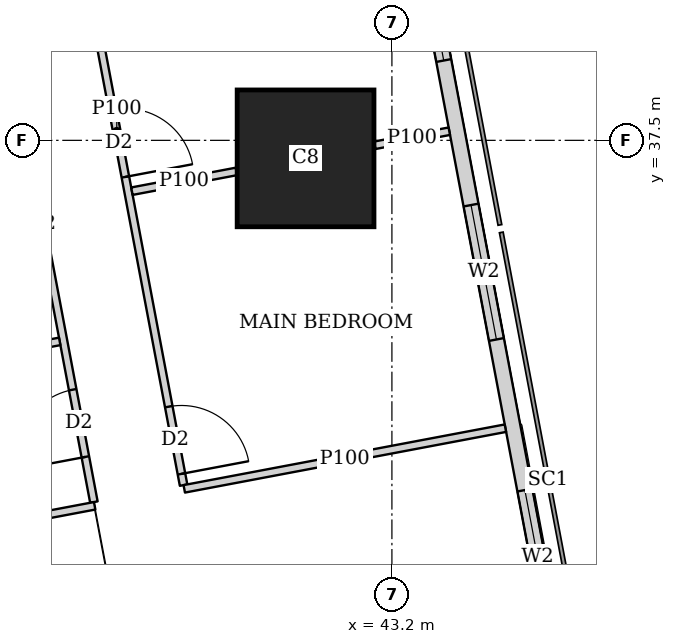
"""IFC4 building model, lengths in metres.
Left out: names, types, materials, properties, quantities, classifications, styles, units other than length and angle.
Written with IfcOpenShell. Run it as: python <this file> out.ifc"""

import sys

from ifc_helpers import new_model, si_unit, direction, frame, frame_2d, origin, origin_2d, place, context, subcontext, project, spatial, rectangle, extrude, element, fill, save


model = new_model("IFC4")
c1 = context("Model", 3, precision=1e-05, world=origin(), true_north=direction((0.0, 1.0)))
c2 = subcontext(c1, "Body", "Model", "MODEL_VIEW")
j1 = project(units=[si_unit("LENGTHUNIT", "METRE"), si_unit("PLANEANGLEUNIT", "RADIAN")], contexts=[c1])
p1 = place(None, origin())
s1 = spatial("IfcSite", under=j1, at=p1, CompositionType="ELEMENT")
p2 = place(p1, origin())
s2 = spatial("IfcBuilding", under=s1, at=p2, CompositionType="ELEMENT")
p3 = place(p2, frame((0.0, 0.0, 147.05)))
s3 = spatial("IfcBuildingStorey", under=s2, at=p3, CompositionType="ELEMENT", Elevation=147.05)
p4 = place(p3, frame((42.064, 37.263, 0.0), z_axis=(0.0, 0.0, 1.0), x_axis=(1.0, 0.0, 0.0)))
e1 = element("IfcColumn", 1, at=p4, inside=s3, PredefinedType="COLUMN", context=c2, shape_type="SweptSolid", body=[
    extrude(rectangle(XDim=1.8, YDim=1.8, at=origin_2d()), origin(), (0.0, 0.0, 1.0), 3.75),
])
p5 = place(p3, frame((50.653, 2.703, 0.0), z_axis=(0.0, 0.0, 1.0), x_axis=(-0.185612026696, 0.982623109613, 0.0)))
e2 = element("IfcWall", 2, at=p5, inside=s3, PredefinedType="SOLIDWALL", context=c2, shape_type="SweptSolid", body=[
    extrude(rectangle(XDim=41.393, YDim=0.2, at=frame_2d((20.697, 0.0))), origin(), (0.0, 0.0, 1.0), 3.5),
])
p6 = place(p5, frame((1.633, 0.0, 0.9)))
e3 = element("IfcOpeningElement", 3, at=p6, cuts=e2, PredefinedType="OPENING", context=c2, shape_type="SweptSolid", body=[
    extrude(rectangle(XDim=1.8, YDim=1.5, at=frame_2d((0.9, 0.75))), frame((0.0, 0.11, 0.0), z_axis=(0.0, -1.0, 0.0), x_axis=(1.0, 0.0, 0.0)), (0.0, 0.0, 1.0), 0.22),
])
p7 = place(p5, frame((6.032, 0.0, 0.9)))
e4 = element("IfcOpeningElement", 4, at=p7, cuts=e2, PredefinedType="OPENING", context=c2, shape_type="SweptSolid", body=[
    extrude(rectangle(XDim=1.8, YDim=1.5, at=frame_2d((0.9, 0.75))), frame((0.0, 0.11, 0.0), z_axis=(0.0, -1.0, 0.0), x_axis=(1.0, 0.0, 0.0)), (0.0, 0.0, 1.0), 0.22),
])
p8 = place(p5, frame((9.848, 0.0, 0.9)))
e5 = element("IfcOpeningElement", 5, at=p8, cuts=e2, PredefinedType="OPENING", context=c2, shape_type="SweptSolid", body=[
    extrude(rectangle(XDim=1.8, YDim=1.5, at=frame_2d((0.9, 0.75))), frame((0.0, 0.11, 0.0), z_axis=(0.0, -1.0, 0.0), x_axis=(1.0, 0.0, 0.0)), (0.0, 0.0, 1.0), 0.22),
])
p9 = place(p5, frame((13.664, 0.0, 0.9)))
e6 = element("IfcOpeningElement", 6, at=p9, cuts=e2, PredefinedType="OPENING", context=c2, shape_type="SweptSolid", body=[
    extrude(rectangle(XDim=1.8, YDim=1.5, at=frame_2d((0.9, 0.75))), frame((0.0, 0.11, 0.0), z_axis=(0.0, -1.0, 0.0), x_axis=(1.0, 0.0, 0.0)), (0.0, 0.0, 1.0), 0.22),
])
p10 = place(p5, frame((17.481, 0.0, 0.9)))
e7 = element("IfcOpeningElement", 7, at=p10, cuts=e2, PredefinedType="OPENING", context=c2, shape_type="SweptSolid", body=[
    extrude(rectangle(XDim=1.8, YDim=1.5, at=frame_2d((0.9, 0.75))), frame((0.0, 0.11, 0.0), z_axis=(0.0, -1.0, 0.0), x_axis=(1.0, 0.0, 0.0)), (0.0, 0.0, 1.0), 0.22),
])
p11 = place(p5, frame((21.297, 0.0, 0.9)))
e8 = element("IfcOpeningElement", 8, at=p11, cuts=e2, PredefinedType="OPENING", context=c2, shape_type="SweptSolid", body=[
    extrude(rectangle(XDim=1.8, YDim=1.5, at=frame_2d((0.9, 0.75))), frame((0.0, 0.11, 0.0), z_axis=(0.0, -1.0, 0.0), x_axis=(1.0, 0.0, 0.0)), (0.0, 0.0, 1.0), 0.22),
])
p12 = place(p5, frame((25.113, 0.0, 0.9)))
e9 = element("IfcOpeningElement", 9, at=p12, cuts=e2, PredefinedType="OPENING", context=c2, shape_type="SweptSolid", body=[
    extrude(rectangle(XDim=1.8, YDim=1.5, at=frame_2d((0.9, 0.75))), frame((0.0, 0.11, 0.0), z_axis=(0.0, -1.0, 0.0), x_axis=(1.0, 0.0, 0.0)), (0.0, 0.0, 1.0), 0.22),
])
p13 = place(p5, frame((28.93, 0.0, 0.9)))
e10 = element("IfcOpeningElement", 10, at=p13, cuts=e2, PredefinedType="OPENING", context=c2, shape_type="SweptSolid", body=[
    extrude(rectangle(XDim=1.8, YDim=1.5, at=frame_2d((0.9, 0.75))), frame((0.0, 0.11, 0.0), z_axis=(0.0, -1.0, 0.0), x_axis=(1.0, 0.0, 0.0)), (0.0, 0.0, 1.0), 0.22),
])
p14 = place(p5, frame((32.746, 0.0, 0.9)))
e11 = element("IfcOpeningElement", 11, at=p14, cuts=e2, PredefinedType="OPENING", context=c2, shape_type="SweptSolid", body=[
    extrude(rectangle(XDim=1.8, YDim=1.5, at=frame_2d((0.9, 0.75))), frame((0.0, 0.11, 0.0), z_axis=(0.0, -1.0, 0.0), x_axis=(1.0, 0.0, 0.0)), (0.0, 0.0, 1.0), 0.22),
])
p15 = place(p5, frame((36.481, 0.0, 0.9)))
e12 = element("IfcOpeningElement", 12, at=p15, cuts=e2, PredefinedType="OPENING", context=c2, shape_type="SweptSolid", body=[
    extrude(rectangle(XDim=1.8, YDim=1.5, at=frame_2d((0.9, 0.75))), frame((0.0, 0.11, 0.0), z_axis=(0.0, -1.0, 0.0), x_axis=(1.0, 0.0, 0.0)), (0.0, 0.0, 1.0), 0.22),
])
p16 = place(p3, frame((33.877, 43.029, 0.0), z_axis=(0.0, 0.0, 1.0), x_axis=(0.185596841028, -0.98262597798, 0.0)))
e13 = element("IfcWall", 13, at=p16, inside=s3, PredefinedType="SOLIDWALL", context=c2, shape_type="SweptSolid", body=[
    extrude(rectangle(XDim=41.66, YDim=0.15, at=frame_2d((20.83, 0.0))), origin(), (0.0, 0.0, 1.0), 2.5),
])
p17 = place(p16, frame((12.57, 0.0, 0.0)))
e14 = element("IfcOpeningElement", 14, at=p17, cuts=e13, PredefinedType="OPENING", context=c2, shape_type="SweptSolid", body=[
    extrude(rectangle(XDim=1.0, YDim=2.1, at=frame_2d((0.5, 1.05))), frame((0.0, 0.085, 0.0), z_axis=(0.0, -1.0, 0.0), x_axis=(1.0, 0.0, 0.0)), (0.0, 0.0, 1.0), 0.17),
])
p18 = place(p16, frame((16.386, 0.0, 0.0)))
e15 = element("IfcOpeningElement", 15, at=p18, cuts=e13, PredefinedType="OPENING", context=c2, shape_type="SweptSolid", body=[
    extrude(rectangle(XDim=1.0, YDim=2.1, at=frame_2d((0.5, 1.05))), frame((0.0, 0.085, 0.0), z_axis=(0.0, -1.0, 0.0), x_axis=(1.0, 0.0, 0.0)), (0.0, 0.0, 1.0), 0.17),
])
p19 = place(p16, frame((31.166, 0.0, 0.0)))
e16 = element("IfcOpeningElement", 16, at=p19, cuts=e13, PredefinedType="OPENING", context=c2, shape_type="SweptSolid", body=[
    extrude(rectangle(XDim=1.0, YDim=2.1, at=frame_2d((0.5, 1.05))), frame((0.0, 0.085, 0.0), z_axis=(0.0, -1.0, 0.0), x_axis=(1.0, 0.0, 0.0)), (0.0, 0.0, 1.0), 0.17),
])
p20 = place(p3, frame((38.701, 42.27, 0.0), z_axis=(0.0, 0.0, 1.0), x_axis=(0.185634707842, -0.982618825, 0.0)))
e17 = element("IfcWall", 17, at=p20, inside=s3, PredefinedType="PARTITIONING", context=c2, shape_type="SweptSolid", body=[
    extrude(rectangle(XDim=9.47, YDim=0.1, at=frame_2d((4.735, 0.0))), origin(), (0.0, 0.0, 1.0), 3.5),
])
p21 = place(p20, frame((8.42, 0.0, 0.0)))
e18 = element("IfcOpeningElement", 18, at=p21, cuts=e17, PredefinedType="OPENING", context=c2, shape_type="SweptSolid", body=[
    extrude(rectangle(XDim=0.9, YDim=2.1, at=frame_2d((0.45, 1.05))), frame((0.0, 0.06, 0.0), z_axis=(0.0, -1.0, 0.0), x_axis=(1.0, 0.0, 0.0)), (0.0, 0.0, 1.0), 0.12),
])
p22 = place(p20, frame((4.444, 0.0, 0.0)))
e19 = element("IfcOpeningElement", 19, at=p22, cuts=e17, PredefinedType="OPENING", context=c2, shape_type="SweptSolid", body=[
    extrude(rectangle(XDim=0.9, YDim=2.1, at=frame_2d((0.45, 1.05))), frame((0.0, 0.06, 0.0), z_axis=(0.0, -1.0, 0.0), x_axis=(1.0, 0.0, 0.0)), (0.0, 0.0, 1.0), 0.12),
])
p23 = place(p3, frame((37.411, 42.638, 0.0), z_axis=(0.0, 0.0, 1.0), x_axis=(0.185485587071, -0.982646984928, 0.0)))
e20 = element("IfcWall", 20, at=p23, inside=s3, PredefinedType="PARTITIONING", context=c2, shape_type="SweptSolid", body=[
    extrude(rectangle(XDim=10.072, YDim=0.1, at=frame_2d((5.036, 0.0))), origin(), (0.0, 0.0, 1.0), 3.5),
])
p24 = place(p23, frame((8.567, 0.0, 0.0)))
e21 = element("IfcOpeningElement", 21, at=p24, cuts=e20, PredefinedType="OPENING", context=c2, shape_type="SweptSolid", body=[
    extrude(rectangle(XDim=0.9, YDim=2.1, at=frame_2d((0.45, 1.05))), frame((0.0, 0.06, 0.0), z_axis=(0.0, -1.0, 0.0), x_axis=(1.0, 0.0, 0.0)), (0.0, 0.0, 1.0), 0.12),
])
p25 = place(p23, frame((3.188, 0.0, 0.0)))
e22 = element("IfcOpeningElement", 22, at=p25, cuts=e20, PredefinedType="OPENING", context=c2, shape_type="SweptSolid", body=[
    extrude(rectangle(XDim=0.9, YDim=2.1, at=frame_2d((0.45, 1.05))), frame((0.0, 0.06, 0.0), z_axis=(0.0, -1.0, 0.0), x_axis=(1.0, 0.0, 0.0)), (0.0, 0.0, 1.0), 0.12),
])
p26 = place(p23, frame((1.129, 0.0, 0.0)))
e23 = element("IfcOpeningElement", 23, at=p26, cuts=e20, PredefinedType="OPENING", context=c2, shape_type="SweptSolid", body=[
    extrude(rectangle(XDim=0.9, YDim=2.1, at=frame_2d((0.45, 1.05))), frame((0.0, 0.06, 0.0), z_axis=(0.0, -1.0, 0.0), x_axis=(1.0, 0.0, 0.0)), (0.0, 0.0, 1.0), 0.12),
])
p27 = place(p23, frame((5.899, 0.0, 0.0)))
e24 = element("IfcOpeningElement", 24, at=p27, cuts=e20, PredefinedType="OPENING", context=c2, shape_type="SweptSolid", body=[
    extrude(rectangle(XDim=0.9, YDim=2.1, at=frame_2d((0.45, 1.05))), frame((0.0, 0.06, 0.0), z_axis=(0.0, -1.0, 0.0), x_axis=(1.0, 0.0, 0.0)), (0.0, 0.0, 1.0), 0.12),
])
p28 = place(p3, frame((43.955, 37.62, 0.0), z_axis=(0.0, 0.0, 1.0), x_axis=(-0.982666697719, -0.185381124159, 0.0)))
e25 = element("IfcWall", 25, at=p28, inside=s3, PredefinedType="PARTITIONING", context=c2, shape_type="SweptSolid", body=[
    extrude(rectangle(XDim=0.998, YDim=0.1, at=frame_2d((0.499, 0.0))), origin(), (0.0, 0.0, 1.0), 3.5),
])
p29 = place(p3, frame((41.154, 37.091, 0.0), z_axis=(0.0, 0.0, 1.0), x_axis=(-0.982586605669, -0.185805173125, 0.0)))
e26 = element("IfcWall", 26, at=p29, inside=s3, PredefinedType="PARTITIONING", context=c2, shape_type="SweptSolid", body=[
    extrude(rectangle(XDim=1.399, YDim=0.1, at=frame_2d((0.7, 0.0))), origin(), (0.0, 0.0, 1.0), 3.5),
])
p30 = place(p3, frame((44.693, 33.713, 0.0), z_axis=(0.0, 0.0, 1.0), x_axis=(-0.982633535512, -0.185556823879, 0.0)))
e27 = element("IfcWall", 27, at=p30, inside=s3, PredefinedType="PARTITIONING", context=c2, shape_type="SweptSolid", body=[
    extrude(rectangle(XDim=4.3, YDim=0.1, at=frame_2d((2.15, 0.0))), origin(), (0.0, 0.0, 1.0), 2.1),
])
p31 = place(p3, frame((39.289, 32.692, 0.0), z_axis=(0.0, 0.0, 1.0), x_axis=(-0.982633623707, -0.185556356831, 0.0)))
e28 = element("IfcWall", 28, at=p31, inside=s3, PredefinedType="PARTITIONING", context=c2, shape_type="SweptSolid", body=[
    extrude(rectangle(XDim=3.325, YDim=0.1, at=frame_2d((1.663, 0.0))), origin(), (0.0, 0.0, 1.0), 3.5),
])
p32 = place(p3, frame((38.829, 34.855, 0.0), z_axis=(0.0, 0.0, 1.0), x_axis=(-0.982610347627, -0.185679575441, 0.0)))
e29 = element("IfcWall", 29, at=p32, inside=s3, PredefinedType="PARTITIONING", context=c2, shape_type="SweptSolid", body=[
    extrude(rectangle(XDim=3.274, YDim=0.1, at=frame_2d((1.637, 0.0))), origin(), (0.0, 0.0, 1.0), 3.5),
])
p33 = place(p13, origin())
e30 = element("IfcWindow", 30, at=p33, inside=s3, PartitioningType="SINGLE_PANEL", PredefinedType="WINDOW", context=c2, shape_type="SweptSolid", body=[
    extrude(rectangle(XDim=1.8, YDim=1.5, at=frame_2d((0.9, 0.75))), frame((0.0, 0.03, 0.0), z_axis=(0.0, -1.0, 0.0), x_axis=(1.0, 0.0, 0.0)), (0.0, 0.0, 1.0), 0.06),
])
fill(e10, e30)
p34 = place(p14, origin())
e31 = element("IfcWindow", 31, at=p34, inside=s3, PartitioningType="SINGLE_PANEL", PredefinedType="WINDOW", context=c2, shape_type="SweptSolid", body=[
    extrude(rectangle(XDim=1.8, YDim=1.5, at=frame_2d((0.9, 0.75))), frame((0.0, 0.03, 0.0), z_axis=(0.0, -1.0, 0.0), x_axis=(1.0, 0.0, 0.0)), (0.0, 0.0, 1.0), 0.06),
])
fill(e11, e31)
p35 = place(p15, origin())
e32 = element("IfcWindow", 32, at=p35, inside=s3, PartitioningType="SINGLE_PANEL", PredefinedType="WINDOW", context=c2, shape_type="SweptSolid", body=[
    extrude(rectangle(XDim=1.8, YDim=1.5, at=frame_2d((0.9, 0.75))), frame((0.0, 0.03, 0.0), z_axis=(0.0, -1.0, 0.0), x_axis=(1.0, 0.0, 0.0)), (0.0, 0.0, 1.0), 0.06),
])
fill(e12, e32)
p36 = place(p21, origin())
e33 = element("IfcDoor", 33, at=p36, inside=s3, OperationType="SINGLE_SWING_RIGHT", PredefinedType="DOOR", context=c2, shape_type="SweptSolid", body=[
    extrude(rectangle(XDim=0.9, YDim=2.1, at=frame_2d((0.45, 1.05))), frame((0.0, 0.025, 0.0), z_axis=(0.0, -1.0, 0.0), x_axis=(1.0, 0.0, 0.0)), (0.0, 0.0, 1.0), 0.05),
])
fill(e18, e33)
p37 = place(p22, origin())
e34 = element("IfcDoor", 34, at=p37, inside=s3, OperationType="SINGLE_SWING_RIGHT", PredefinedType="DOOR", context=c2, shape_type="SweptSolid", body=[
    extrude(rectangle(XDim=0.9, YDim=2.1, at=frame_2d((0.45, 1.05))), frame((0.0, 0.025, 0.0), z_axis=(0.0, -1.0, 0.0), x_axis=(1.0, 0.0, 0.0)), (0.0, 0.0, 1.0), 0.05),
])
fill(e19, e34)
p38 = place(p24, origin())
e35 = element("IfcDoor", 35, at=p38, inside=s3, OperationType="SINGLE_SWING_LEFT", PredefinedType="DOOR", context=c2, shape_type="SweptSolid", body=[
    extrude(rectangle(XDim=0.9, YDim=2.1, at=frame_2d((0.45, 1.05))), frame((0.0, 0.025, 0.0), z_axis=(0.0, -1.0, 0.0), x_axis=(1.0, 0.0, 0.0)), (0.0, 0.0, 1.0), 0.05),
])
fill(e21, e35)
save(model, sys.argv[1])
